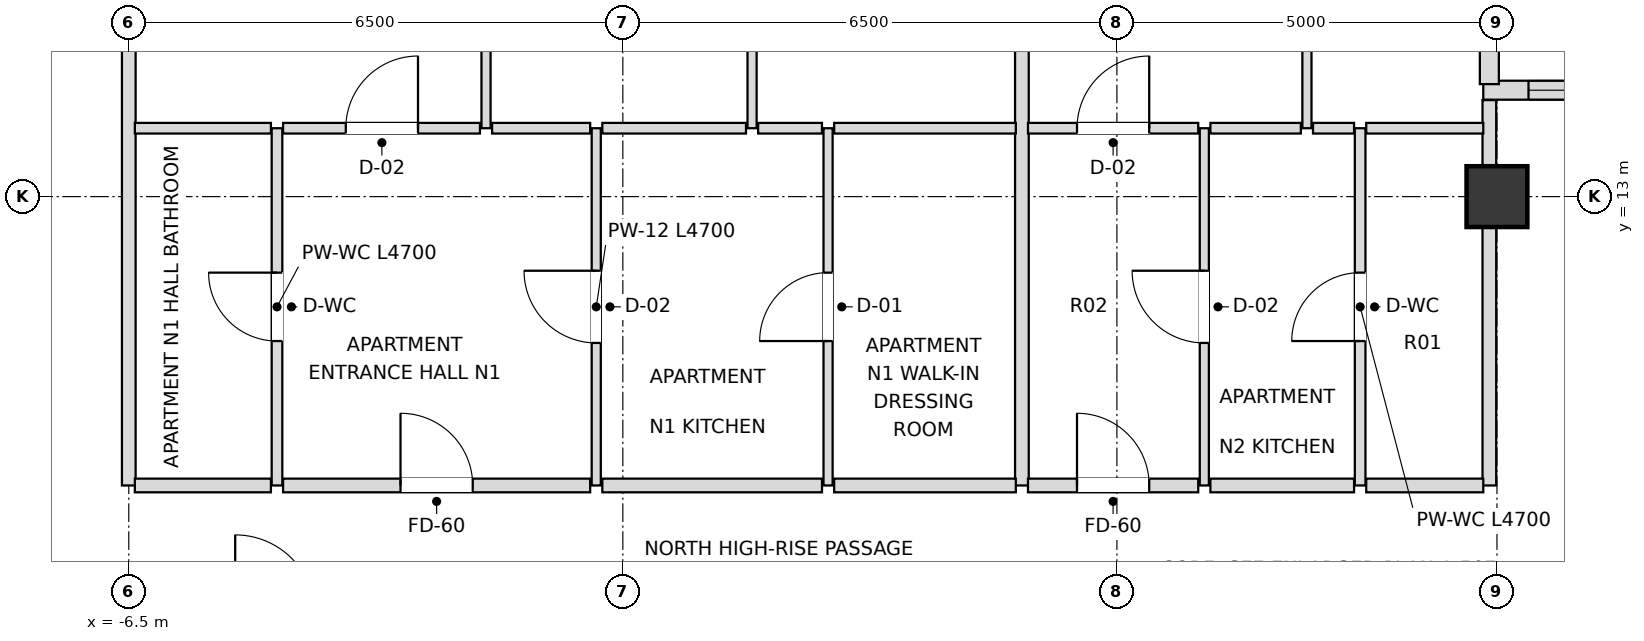
"""IFC4 building model, lengths in metres.
Left out: names, types, materials, properties, quantities, classifications, styles, units other than length and angle.
Written with IfcOpenShell. Run it as: python <this file> out.ifc"""

import sys

from ifc_helpers import new_model, si_unit, direction, frame, frame_2d, origin, origin_2d, place, context, subcontext, project, spatial, rectangle, extrude, element, fill, save


model = new_model("IFC4")
c1 = context("Model", 3, precision=1e-05, world=origin(), true_north=direction((0.0, 1.0)))
c2 = subcontext(c1, "Body", "Model", "MODEL_VIEW")
j1 = project(units=[si_unit("LENGTHUNIT", "METRE"), si_unit("PLANEANGLEUNIT", "RADIAN")], contexts=[c1])
p1 = place(None, origin())
s1 = spatial("IfcSite", under=j1, at=p1, CompositionType="ELEMENT")
p2 = place(p1, origin())
s2 = spatial("IfcBuilding", under=s1, at=p2, CompositionType="ELEMENT")
p3 = place(p2, frame((0.0, 0.0, 283.5)))
s3 = spatial("IfcBuildingStorey", under=s2, at=p3, CompositionType="ELEMENT", Elevation=283.5)
p4 = place(p3, frame((11.5, 13.0, 0.0), z_axis=(0.0, 0.0, 1.0), x_axis=(1.0, 0.0, 0.0)))
e1 = element("IfcColumn", 1, at=p4, inside=s3, PredefinedType="COLUMN", context=c2, shape_type="SweptSolid", body=[
    extrude(rectangle(XDim=0.8, YDim=0.8, at=origin_2d()), origin(), (0.0, 0.0, 1.0), 3.6),
])
p5 = place(p3, frame((16.98, 14.4, 0.0), z_axis=(0.0, 0.0, 1.0), x_axis=(-1.0, 0.0, 0.0)))
e2 = element("IfcWall", 2, at=p5, inside=s3, PredefinedType="SOLIDWALL", context=c2, shape_type="SweptSolid", body=[
    extrude(rectangle(XDim=5.66, YDim=0.25, at=frame_2d((2.83, 0.0))), origin(), (0.0, 0.0, 1.0), 2.748),
])
p6 = place(p5, frame((0.595, 0.0, 0.72)))
e3 = element("IfcOpeningElement", 3, at=p6, cuts=e2, PredefinedType="OPENING", context=c2, shape_type="SweptSolid", body=[
    extrude(rectangle(XDim=1.8, YDim=1.68, at=frame_2d((0.9, 0.84))), frame((0.0, 0.135, 0.0), z_axis=(0.0, -1.0, 0.0), x_axis=(1.0, 0.0, 0.0)), (0.0, 0.0, 1.0), 0.27),
])
p7 = place(p5, frame((3.265, 0.0, 0.72)))
e4 = element("IfcOpeningElement", 4, at=p7, cuts=e2, PredefinedType="OPENING", context=c2, shape_type="SweptSolid", body=[
    extrude(rectangle(XDim=1.8, YDim=1.68, at=frame_2d((0.9, 0.84))), frame((0.0, 0.135, 0.0), z_axis=(0.0, -1.0, 0.0), x_axis=(1.0, 0.0, 0.0)), (0.0, 0.0, 1.0), 0.27),
])
p8 = place(p3, frame((11.4, 14.48, 0.0), z_axis=(0.0, 0.0, 1.0), x_axis=(0.0, 1.0, 0.0)))
e5 = element("IfcWall", 5, at=p8, inside=s3, PredefinedType="SOLIDWALL", context=c2, shape_type="SweptSolid", body=[
    extrude(rectangle(XDim=5.34, YDim=0.25, at=frame_2d((2.67, 0.0))), origin(), (0.0, 0.0, 1.0), 2.748),
])
p9 = place(p8, frame((1.615, 0.0, 0.72)))
e6 = element("IfcOpeningElement", 6, at=p9, cuts=e5, PredefinedType="OPENING", context=c2, shape_type="SweptSolid", body=[
    extrude(rectangle(XDim=1.8, YDim=1.68, at=frame_2d((0.9, 0.84))), frame((0.0, 0.135, 0.0), z_axis=(0.0, -1.0, 0.0), x_axis=(1.0, 0.0, 0.0)), (0.0, 0.0, 1.0), 0.27),
])
p10 = place(p3, frame((-6.5, 9.2, 0.0), z_axis=(0.0, 0.0, 1.0), x_axis=(0.0, 1.0, 0.0)))
e7 = element("IfcWall", 7, at=p10, inside=s3, PredefinedType="PARTITIONING", context=c2, shape_type="SweptSolid", body=[
    extrude(rectangle(XDim=10.7, YDim=0.18, at=frame_2d((5.35, 0.0))), origin(), (0.0, 0.0, 1.0), 2.826),
])
p11 = place(p3, frame((-4.55, 9.2, 0.0), z_axis=(0.0, 0.0, 1.0), x_axis=(0.0, 1.0, 0.0)))
e8 = element("IfcWall", 8, at=p11, inside=s3, PredefinedType="PARTITIONING", context=c2, shape_type="SweptSolid", body=[
    extrude(rectangle(XDim=4.7, YDim=0.14, at=frame_2d((2.35, 0.0))), origin(), (0.0, 0.0, 1.0), 3.38),
])
p12 = place(p11, frame((1.9, 0.0, 0.0)))
e9 = element("IfcOpeningElement", 9, at=p12, cuts=e8, PredefinedType="OPENING", context=c2, shape_type="SweptSolid", body=[
    extrude(rectangle(XDim=0.9, YDim=2.1, at=frame_2d((0.45, 1.05))), frame((0.0, 0.08, 0.0), z_axis=(0.0, -1.0, 0.0), x_axis=(1.0, 0.0, 0.0)), (0.0, 0.0, 1.0), 0.16),
])
p13 = place(p3, frame((-1.8, 13.9, 0.0), z_axis=(0.0, 0.0, 1.0), x_axis=(0.0, 1.0, 0.0)))
e10 = element("IfcWall", 10, at=p13, inside=s3, PredefinedType="PARTITIONING", context=c2, shape_type="SweptSolid", body=[
    extrude(rectangle(XDim=6.0, YDim=0.12, at=frame_2d((3.0, 0.0))), origin(), (0.0, 0.0, 1.0), 3.018),
])
p14 = place(p13, frame((2.55, 0.0, 0.0)))
e11 = element("IfcOpeningElement", 11, at=p14, cuts=e10, PredefinedType="OPENING", context=c2, shape_type="SweptSolid", body=[
    extrude(rectangle(XDim=0.9, YDim=2.1, at=frame_2d((0.45, 1.05))), frame((0.0, 0.07, 0.0), z_axis=(0.0, -1.0, 0.0), x_axis=(1.0, 0.0, 0.0)), (0.0, 0.0, 1.0), 0.14),
])
p15 = place(p3, frame((-0.35, 9.2, 0.0), z_axis=(0.0, 0.0, 1.0), x_axis=(0.0, 1.0, 0.0)))
e12 = element("IfcWall", 12, at=p15, inside=s3, PredefinedType="PARTITIONING", context=c2, shape_type="SweptSolid", body=[
    extrude(rectangle(XDim=4.7, YDim=0.12, at=frame_2d((2.35, 0.0))), origin(), (0.0, 0.0, 1.0), 3.38),
])
p16 = place(p15, frame((1.875, 0.0, 0.0)))
e13 = element("IfcOpeningElement", 13, at=p16, cuts=e12, PredefinedType="OPENING", context=c2, shape_type="SweptSolid", body=[
    extrude(rectangle(XDim=0.95, YDim=2.1, at=frame_2d((0.475, 1.05))), frame((0.0, 0.07, 0.0), z_axis=(0.0, -1.0, 0.0), x_axis=(1.0, 0.0, 0.0)), (0.0, 0.0, 1.0), 0.14),
])
p17 = place(p3, frame((1.7, 13.9, 0.0), z_axis=(0.0, 0.0, 1.0), x_axis=(0.0, 1.0, 0.0)))
e14 = element("IfcWall", 14, at=p17, inside=s3, PredefinedType="PARTITIONING", context=c2, shape_type="SweptSolid", body=[
    extrude(rectangle(XDim=6.0, YDim=0.12, at=frame_2d((3.0, 0.0))), origin(), (0.0, 0.0, 1.0), 3.018),
])
p18 = place(p17, frame((2.55, 0.0, 0.0)))
e15 = element("IfcOpeningElement", 15, at=p18, cuts=e14, PredefinedType="OPENING", context=c2, shape_type="SweptSolid", body=[
    extrude(rectangle(XDim=0.9, YDim=2.1, at=frame_2d((0.45, 1.05))), frame((0.0, 0.07, 0.0), z_axis=(0.0, -1.0, 0.0), x_axis=(1.0, 0.0, 0.0)), (0.0, 0.0, 1.0), 0.14),
])
p19 = place(p3, frame((2.7, 9.2, 0.0), z_axis=(0.0, 0.0, 1.0), x_axis=(0.0, 1.0, 0.0)))
e16 = element("IfcWall", 16, at=p19, inside=s3, PredefinedType="PARTITIONING", context=c2, shape_type="SweptSolid", body=[
    extrude(rectangle(XDim=4.7, YDim=0.12, at=frame_2d((2.35, 0.0))), origin(), (0.0, 0.0, 1.0), 3.38),
])
p20 = place(p19, frame((1.9, 0.0, 0.0)))
e17 = element("IfcOpeningElement", 17, at=p20, cuts=e16, PredefinedType="OPENING", context=c2, shape_type="SweptSolid", body=[
    extrude(rectangle(XDim=0.9, YDim=2.1, at=frame_2d((0.45, 1.05))), frame((0.0, 0.07, 0.0), z_axis=(0.0, -1.0, 0.0), x_axis=(1.0, 0.0, 0.0)), (0.0, 0.0, 1.0), 0.14),
])
p21 = place(p3, frame((5.25, 9.2, 0.0), z_axis=(0.0, 0.0, 1.0), x_axis=(0.0, 1.0, 0.0)))
e18 = element("IfcWall", 18, at=p21, inside=s3, PredefinedType="PARTITIONING", context=c2, shape_type="SweptSolid", body=[
    extrude(rectangle(XDim=10.7, YDim=0.18, at=frame_2d((5.35, 0.0))), origin(), (0.0, 0.0, 1.0), 3.018),
])
p22 = place(p3, frame((7.65, 9.2, 0.0), z_axis=(0.0, 0.0, 1.0), x_axis=(0.0, 1.0, 0.0)))
e19 = element("IfcWall", 19, at=p22, inside=s3, PredefinedType="PARTITIONING", context=c2, shape_type="SweptSolid", body=[
    extrude(rectangle(XDim=4.7, YDim=0.12, at=frame_2d((2.35, 0.0))), origin(), (0.0, 0.0, 1.0), 2.826),
])
p23 = place(p22, frame((1.875, 0.0, 0.0)))
e20 = element("IfcOpeningElement", 20, at=p23, cuts=e19, PredefinedType="OPENING", context=c2, shape_type="SweptSolid", body=[
    extrude(rectangle(XDim=0.95, YDim=2.1, at=frame_2d((0.475, 1.05))), frame((0.0, 0.07, 0.0), z_axis=(0.0, -1.0, 0.0), x_axis=(1.0, 0.0, 0.0)), (0.0, 0.0, 1.0), 0.14),
])
p24 = place(p3, frame((9.0, 13.9, 0.0), z_axis=(0.0, 0.0, 1.0), x_axis=(0.0, 1.0, 0.0)))
e21 = element("IfcWall", 21, at=p24, inside=s3, PredefinedType="PARTITIONING", context=c2, shape_type="SweptSolid", body=[
    extrude(rectangle(XDim=6.0, YDim=0.12, at=frame_2d((3.0, 0.0))), origin(), (0.0, 0.0, 1.0), 3.38),
])
p25 = place(p24, frame((2.55, 0.0, 0.0)))
e22 = element("IfcOpeningElement", 22, at=p25, cuts=e21, PredefinedType="OPENING", context=c2, shape_type="SweptSolid", body=[
    extrude(rectangle(XDim=0.9, YDim=2.1, at=frame_2d((0.45, 1.05))), frame((0.0, 0.07, 0.0), z_axis=(0.0, -1.0, 0.0), x_axis=(1.0, 0.0, 0.0)), (0.0, 0.0, 1.0), 0.14),
])
p26 = place(p3, frame((9.7, 9.2, 0.0), z_axis=(0.0, 0.0, 1.0), x_axis=(0.0, 1.0, 0.0)))
e23 = element("IfcWall", 23, at=p26, inside=s3, PredefinedType="PARTITIONING", context=c2, shape_type="SweptSolid", body=[
    extrude(rectangle(XDim=4.7, YDim=0.14, at=frame_2d((2.35, 0.0))), origin(), (0.0, 0.0, 1.0), 2.826),
])
p27 = place(p26, frame((1.9, 0.0, 0.0)))
e24 = element("IfcOpeningElement", 24, at=p27, cuts=e23, PredefinedType="OPENING", context=c2, shape_type="SweptSolid", body=[
    extrude(rectangle(XDim=0.9, YDim=2.1, at=frame_2d((0.45, 1.05))), frame((0.0, 0.08, 0.0), z_axis=(0.0, -1.0, 0.0), x_axis=(1.0, 0.0, 0.0)), (0.0, 0.0, 1.0), 0.16),
])
p28 = place(p3, frame((11.4, 9.2, 0.0), z_axis=(0.0, 0.0, 1.0), x_axis=(0.0, 1.0, 0.0)))
e25 = element("IfcWall", 25, at=p28, inside=s3, PredefinedType="PARTITIONING", context=c2, shape_type="SweptSolid", body=[
    extrude(rectangle(XDim=5.07, YDim=0.18, at=frame_2d((2.535, 0.0))), origin(), (0.0, 0.0, 1.0), 2.748),
])
p29 = place(p3, frame((-6.42, 9.2, 0.0), z_axis=(0.0, 0.0, 1.0), x_axis=(1.0, 0.0, 0.0)))
e26 = element("IfcWall", 26, at=p29, inside=s3, PredefinedType="PARTITIONING", context=c2, shape_type="SweptSolid", body=[
    extrude(rectangle(XDim=1.79, YDim=0.18, at=frame_2d((0.895, 0.0))), origin(), (0.0, 0.0, 1.0), 3.38),
])
p30 = place(p3, frame((-4.47, 9.2, 0.0), z_axis=(0.0, 0.0, 1.0), x_axis=(1.0, 0.0, 0.0)))
e27 = element("IfcWall", 27, at=p30, inside=s3, PredefinedType="PARTITIONING", context=c2, shape_type="SweptSolid", body=[
    extrude(rectangle(XDim=4.04, YDim=0.18, at=frame_2d((2.02, 0.0))), origin(), (0.0, 0.0, 1.0), 3.38),
])
p31 = place(p30, frame((1.545, 0.0, 0.0)))
e28 = element("IfcOpeningElement", 28, at=p31, cuts=e27, PredefinedType="OPENING", context=c2, shape_type="SweptSolid", body=[
    extrude(rectangle(XDim=0.95, YDim=2.15, at=frame_2d((0.475, 1.075))), frame((0.0, 0.1, 0.0), z_axis=(0.0, -1.0, 0.0), x_axis=(1.0, 0.0, 0.0)), (0.0, 0.0, 1.0), 0.2),
])
p32 = place(p3, frame((-0.27, 9.2, 0.0), z_axis=(0.0, 0.0, 1.0), x_axis=(1.0, 0.0, 0.0)))
e29 = element("IfcWall", 29, at=p32, inside=s3, PredefinedType="PARTITIONING", context=c2, shape_type="SweptSolid", body=[
    extrude(rectangle(XDim=2.89, YDim=0.18, at=frame_2d((1.445, 0.0))), origin(), (0.0, 0.0, 1.0), 3.38),
])
p33 = place(p3, frame((2.78, 9.2, 0.0), z_axis=(0.0, 0.0, 1.0), x_axis=(1.0, 0.0, 0.0)))
e30 = element("IfcWall", 30, at=p33, inside=s3, PredefinedType="PARTITIONING", context=c2, shape_type="SweptSolid", body=[
    extrude(rectangle(XDim=2.39, YDim=0.18, at=frame_2d((1.195, 0.0))), origin(), (0.0, 0.0, 1.0), 3.38),
])
p34 = place(p3, frame((5.33, 9.2, 0.0), z_axis=(0.0, 0.0, 1.0), x_axis=(1.0, 0.0, 0.0)))
e31 = element("IfcWall", 31, at=p34, inside=s3, PredefinedType="PARTITIONING", context=c2, shape_type="SweptSolid", body=[
    extrude(rectangle(XDim=2.24, YDim=0.18, at=frame_2d((1.12, 0.0))), origin(), (0.0, 0.0, 1.0), 2.826),
])
p35 = place(p34, frame((0.645, 0.0, 0.0)))
e32 = element("IfcOpeningElement", 32, at=p35, cuts=e31, PredefinedType="OPENING", context=c2, shape_type="SweptSolid", body=[
    extrude(rectangle(XDim=0.95, YDim=2.15, at=frame_2d((0.475, 1.075))), frame((0.0, 0.1, 0.0), z_axis=(0.0, -1.0, 0.0), x_axis=(1.0, 0.0, 0.0)), (0.0, 0.0, 1.0), 0.2),
])
p36 = place(p3, frame((7.73, 9.2, 0.0), z_axis=(0.0, 0.0, 1.0), x_axis=(1.0, 0.0, 0.0)))
e33 = element("IfcWall", 33, at=p36, inside=s3, PredefinedType="PARTITIONING", context=c2, shape_type="SweptSolid", body=[
    extrude(rectangle(XDim=1.89, YDim=0.18, at=frame_2d((0.945, 0.0))), origin(), (0.0, 0.0, 1.0), 3.38),
])
p37 = place(p3, frame((9.78, 9.2, 0.0), z_axis=(0.0, 0.0, 1.0), x_axis=(1.0, 0.0, 0.0)))
e34 = element("IfcWall", 34, at=p37, inside=s3, PredefinedType="PARTITIONING", context=c2, shape_type="SweptSolid", body=[
    extrude(rectangle(XDim=1.54, YDim=0.18, at=frame_2d((0.77, 0.0))), origin(), (0.0, 0.0, 1.0), 3.38),
])
p38 = place(p3, frame((-6.42, 13.9, 0.0), z_axis=(0.0, 0.0, 1.0), x_axis=(1.0, 0.0, 0.0)))
e35 = element("IfcWall", 35, at=p38, inside=s3, PredefinedType="PARTITIONING", context=c2, shape_type="SweptSolid", body=[
    extrude(rectangle(XDim=1.79, YDim=0.14, at=frame_2d((0.895, 0.0))), origin(), (0.0, 0.0, 1.0), 3.38),
])
p39 = place(p3, frame((-4.47, 13.9, 0.0), z_axis=(0.0, 0.0, 1.0), x_axis=(1.0, 0.0, 0.0)))
e36 = element("IfcWall", 36, at=p39, inside=s3, PredefinedType="PARTITIONING", context=c2, shape_type="SweptSolid", body=[
    extrude(rectangle(XDim=2.59, YDim=0.14, at=frame_2d((1.295, 0.0))), origin(), (0.0, 0.0, 1.0), 3.38),
])
p40 = place(p39, frame((0.825, 0.0, 0.0)))
e37 = element("IfcOpeningElement", 37, at=p40, cuts=e36, PredefinedType="OPENING", context=c2, shape_type="SweptSolid", body=[
    extrude(rectangle(XDim=0.95, YDim=2.1, at=frame_2d((0.475, 1.05))), frame((0.0, 0.08, 0.0), z_axis=(0.0, -1.0, 0.0), x_axis=(1.0, 0.0, 0.0)), (0.0, 0.0, 1.0), 0.16),
])
p41 = place(p3, frame((-1.72, 13.9, 0.0), z_axis=(0.0, 0.0, 1.0), x_axis=(1.0, 0.0, 0.0)))
e38 = element("IfcWall", 38, at=p41, inside=s3, PredefinedType="PARTITIONING", context=c2, shape_type="SweptSolid", body=[
    extrude(rectangle(XDim=1.29, YDim=0.14, at=frame_2d((0.645, 0.0))), origin(), (0.0, 0.0, 1.0), 3.38),
])
p42 = place(p3, frame((-0.27, 13.9, 0.0), z_axis=(0.0, 0.0, 1.0), x_axis=(1.0, 0.0, 0.0)))
e39 = element("IfcWall", 39, at=p42, inside=s3, PredefinedType="PARTITIONING", context=c2, shape_type="SweptSolid", body=[
    extrude(rectangle(XDim=1.89, YDim=0.14, at=frame_2d((0.945, 0.0))), origin(), (0.0, 0.0, 1.0), 3.38),
])
p43 = place(p3, frame((1.78, 13.9, 0.0), z_axis=(0.0, 0.0, 1.0), x_axis=(1.0, 0.0, 0.0)))
e40 = element("IfcWall", 40, at=p43, inside=s3, PredefinedType="PARTITIONING", context=c2, shape_type="SweptSolid", body=[
    extrude(rectangle(XDim=0.84, YDim=0.14, at=frame_2d((0.42, 0.0))), origin(), (0.0, 0.0, 1.0), 3.38),
])
p44 = place(p3, frame((2.78, 13.9, 0.0), z_axis=(0.0, 0.0, 1.0), x_axis=(1.0, 0.0, 0.0)))
e41 = element("IfcWall", 41, at=p44, inside=s3, PredefinedType="PARTITIONING", context=c2, shape_type="SweptSolid", body=[
    extrude(rectangle(XDim=2.39, YDim=0.14, at=frame_2d((1.195, 0.0))), origin(), (0.0, 0.0, 1.0), 3.38),
])
p45 = place(p3, frame((5.33, 13.9, 0.0), z_axis=(0.0, 0.0, 1.0), x_axis=(1.0, 0.0, 0.0)))
e42 = element("IfcWall", 42, at=p45, inside=s3, PredefinedType="PARTITIONING", context=c2, shape_type="SweptSolid", body=[
    extrude(rectangle(XDim=2.24, YDim=0.14, at=frame_2d((1.12, 0.0))), origin(), (0.0, 0.0, 1.0), 2.826),
])
p46 = place(p45, frame((0.645, 0.0, 0.0)))
e43 = element("IfcOpeningElement", 43, at=p46, cuts=e42, PredefinedType="OPENING", context=c2, shape_type="SweptSolid", body=[
    extrude(rectangle(XDim=0.95, YDim=2.1, at=frame_2d((0.475, 1.05))), frame((0.0, 0.08, 0.0), z_axis=(0.0, -1.0, 0.0), x_axis=(1.0, 0.0, 0.0)), (0.0, 0.0, 1.0), 0.16),
])
p47 = place(p3, frame((7.73, 13.9, 0.0), z_axis=(0.0, 0.0, 1.0), x_axis=(1.0, 0.0, 0.0)))
e44 = element("IfcWall", 44, at=p47, inside=s3, PredefinedType="PARTITIONING", context=c2, shape_type="SweptSolid", body=[
    extrude(rectangle(XDim=1.19, YDim=0.14, at=frame_2d((0.595, 0.0))), origin(), (0.0, 0.0, 1.0), 3.38),
])
p48 = place(p3, frame((9.08, 13.9, 0.0), z_axis=(0.0, 0.0, 1.0), x_axis=(1.0, 0.0, 0.0)))
e45 = element("IfcWall", 45, at=p48, inside=s3, PredefinedType="PARTITIONING", context=c2, shape_type="SweptSolid", body=[
    extrude(rectangle(XDim=0.54, YDim=0.14, at=frame_2d((0.27, 0.0))), origin(), (0.0, 0.0, 1.0), 3.38),
])
p49 = place(p3, frame((9.78, 13.9, 0.0), z_axis=(0.0, 0.0, 1.0), x_axis=(1.0, 0.0, 0.0)))
e46 = element("IfcWall", 46, at=p49, inside=s3, PredefinedType="PARTITIONING", context=c2, shape_type="SweptSolid", body=[
    extrude(rectangle(XDim=1.54, YDim=0.14, at=frame_2d((0.77, 0.0))), origin(), (0.0, 0.0, 1.0), 3.38),
])
p50 = place(p7, origin())
e47 = element("IfcWindow", 47, at=p50, inside=s3, PartitioningType="SINGLE_PANEL", PredefinedType="WINDOW", context=c2, shape_type="SweptSolid", body=[
    extrude(rectangle(XDim=1.8, YDim=1.68, at=frame_2d((0.9, 0.84))), frame((0.0, 0.03, 0.0), z_axis=(0.0, -1.0, 0.0), x_axis=(1.0, 0.0, 0.0)), (0.0, 0.0, 1.0), 0.06),
])
fill(e4, e47)
p51 = place(p12, origin())
e48 = element("IfcDoor", 48, at=p51, inside=s3, OperationType="SINGLE_SWING_RIGHT", PredefinedType="DOOR", context=c2, shape_type="SweptSolid", body=[
    extrude(rectangle(XDim=0.9, YDim=2.1, at=frame_2d((0.45, 1.05))), frame((0.0, 0.025, 0.0), z_axis=(0.0, -1.0, 0.0), x_axis=(1.0, 0.0, 0.0)), (0.0, 0.0, 1.0), 0.05),
])
fill(e9, e48)
p52 = place(p31, origin())
e49 = element("IfcDoor", 49, at=p52, inside=s3, OperationType="SINGLE_SWING_LEFT", PredefinedType="DOOR", context=c2, shape_type="SweptSolid", body=[
    extrude(rectangle(XDim=0.95, YDim=2.15, at=frame_2d((0.475, 1.075))), frame((0.0, 0.025, 0.0), z_axis=(0.0, -1.0, 0.0), x_axis=(1.0, 0.0, 0.0)), (0.0, 0.0, 1.0), 0.05),
])
fill(e28, e49)
p53 = place(p16, origin())
e50 = element("IfcDoor", 50, at=p53, inside=s3, OperationType="SINGLE_SWING_RIGHT", PredefinedType="DOOR", context=c2, shape_type="SweptSolid", body=[
    extrude(rectangle(XDim=0.95, YDim=2.1, at=frame_2d((0.475, 1.05))), frame((0.0, 0.025, 0.0), z_axis=(0.0, -1.0, 0.0), x_axis=(1.0, 0.0, 0.0)), (0.0, 0.0, 1.0), 0.05),
])
fill(e13, e50)
p54 = place(p20, origin())
e51 = element("IfcDoor", 51, at=p54, inside=s3, OperationType="SINGLE_SWING_LEFT", PredefinedType="DOOR", context=c2, shape_type="SweptSolid", body=[
    extrude(rectangle(XDim=0.9, YDim=2.1, at=frame_2d((0.45, 1.05))), frame((0.0, 0.025, 0.0), z_axis=(0.0, -1.0, 0.0), x_axis=(1.0, 0.0, 0.0)), (0.0, 0.0, 1.0), 0.05),
])
fill(e17, e51)
p55 = place(p40, origin())
e52 = element("IfcDoor", 52, at=p55, inside=s3, OperationType="SINGLE_SWING_RIGHT", PredefinedType="DOOR", context=c2, shape_type="SweptSolid", body=[
    extrude(rectangle(XDim=0.95, YDim=2.1, at=frame_2d((0.475, 1.05))), frame((0.0, 0.025, 0.0), z_axis=(0.0, -1.0, 0.0), x_axis=(1.0, 0.0, 0.0)), (0.0, 0.0, 1.0), 0.05),
])
fill(e37, e52)
p56 = place(p35, origin())
e53 = element("IfcDoor", 53, at=p56, inside=s3, OperationType="SINGLE_SWING_LEFT", PredefinedType="DOOR", context=c2, shape_type="SweptSolid", body=[
    extrude(rectangle(XDim=0.95, YDim=2.15, at=frame_2d((0.475, 1.075))), frame((0.0, 0.025, 0.0), z_axis=(0.0, -1.0, 0.0), x_axis=(1.0, 0.0, 0.0)), (0.0, 0.0, 1.0), 0.05),
])
fill(e32, e53)
p57 = place(p23, origin())
e54 = element("IfcDoor", 54, at=p57, inside=s3, OperationType="SINGLE_SWING_RIGHT", PredefinedType="DOOR", context=c2, shape_type="SweptSolid", body=[
    extrude(rectangle(XDim=0.95, YDim=2.1, at=frame_2d((0.475, 1.05))), frame((0.0, 0.025, 0.0), z_axis=(0.0, -1.0, 0.0), x_axis=(1.0, 0.0, 0.0)), (0.0, 0.0, 1.0), 0.05),
])
fill(e20, e54)
p58 = place(p27, origin())
e55 = element("IfcDoor", 55, at=p58, inside=s3, OperationType="SINGLE_SWING_LEFT", PredefinedType="DOOR", context=c2, shape_type="SweptSolid", body=[
    extrude(rectangle(XDim=0.9, YDim=2.1, at=frame_2d((0.45, 1.05))), frame((0.0, 0.025, 0.0), z_axis=(0.0, -1.0, 0.0), x_axis=(1.0, 0.0, 0.0)), (0.0, 0.0, 1.0), 0.05),
])
fill(e24, e55)
p59 = place(p46, origin())
e56 = element("IfcDoor", 56, at=p59, inside=s3, OperationType="SINGLE_SWING_RIGHT", PredefinedType="DOOR", context=c2, shape_type="SweptSolid", body=[
    extrude(rectangle(XDim=0.95, YDim=2.1, at=frame_2d((0.475, 1.05))), frame((0.0, 0.025, 0.0), z_axis=(0.0, -1.0, 0.0), x_axis=(1.0, 0.0, 0.0)), (0.0, 0.0, 1.0), 0.05),
])
fill(e43, e56)
save(model, sys.argv[1])
